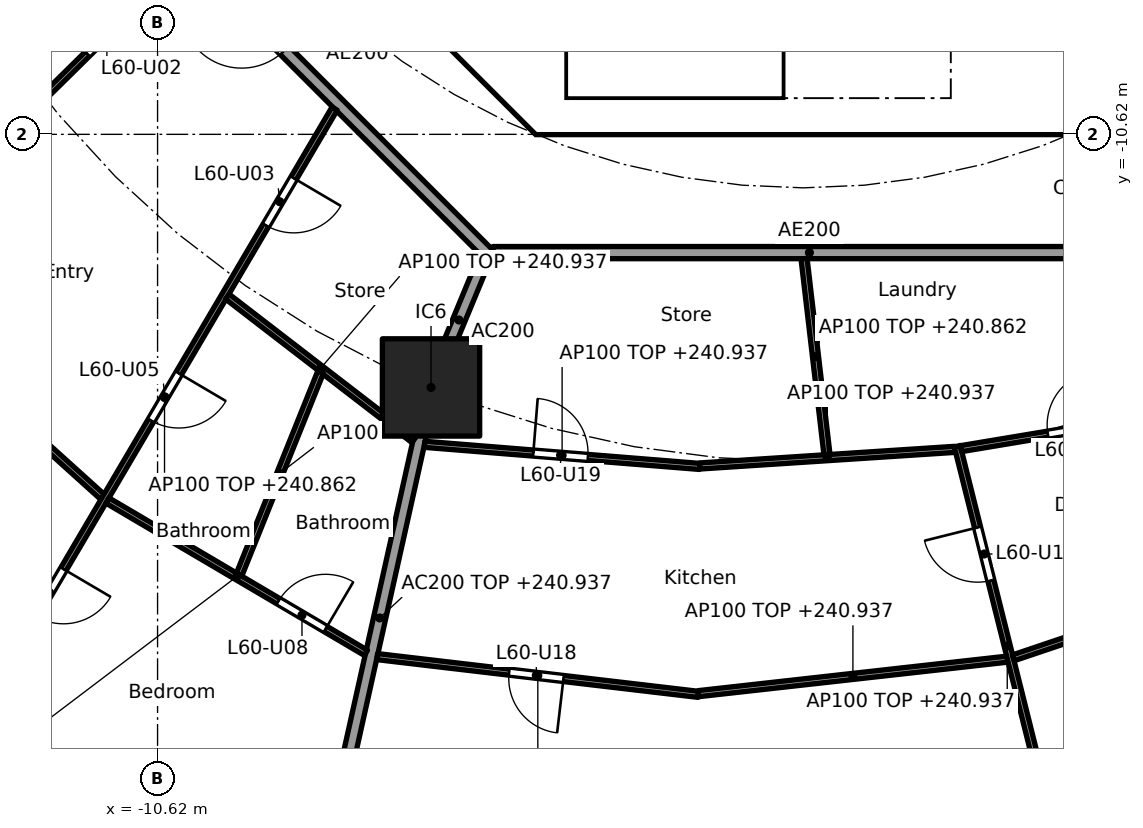
"""IFC4 building model, lengths in metres.
Left out: names, types, materials, properties, quantities, classifications, styles, units other than length and angle.
Written with IfcOpenShell. Run it as: python <this file> out.ifc"""

import sys

from ifc_helpers import new_model, si_unit, direction, frame, frame_2d, origin, origin_2d, place, context, subcontext, project, spatial, polyline, rectangle, outline, extrude, element, fill, save


model = new_model("IFC4")
c1 = context("Model", 3, precision=1e-05, world=origin(), true_north=direction((0.0, 1.0)))
c2 = subcontext(c1, "Body", "Model", "MODEL_VIEW")
j1 = project(units=[si_unit("LENGTHUNIT", "METRE"), si_unit("PLANEANGLEUNIT", "RADIAN")], contexts=[c1])
p1 = place(None, origin())
s1 = spatial("IfcSite", under=j1, at=p1, CompositionType="ELEMENT")
p2 = place(p1, origin())
s2 = spatial("IfcBuilding", under=s1, at=p2, CompositionType="ELEMENT")
p3 = place(p2, frame((0.0, 0.0, 238.1)))
s3 = spatial("IfcBuildingStorey", under=s2, at=p3, CompositionType="ELEMENT", Elevation=238.1)
p4 = place(p3, frame((-6.123, -14.782, 0.0), z_axis=(0.0, 0.0, 1.0), x_axis=(1.0, 0.0, 0.0)))
e1 = element("IfcColumn", 1, at=p4, inside=s3, PredefinedType="COLUMN", context=c2, shape_type="SweptSolid", body=[
    extrude(rectangle(XDim=1.6, YDim=1.6, at=origin_2d()), origin(), (0.0, 0.0, 1.0), 3.7),
])
p5 = place(p3, frame((-9.988, -4.613, 0.0), z_axis=(0.0, 0.0, 1.0), x_axis=(0.707106781187, -0.707106781187, 0.0)))
e2 = element("IfcWall", 2, at=p5, inside=s3, PredefinedType="SHEAR", context=c2, shape_type="SweptSolid", body=[
    extrude(rectangle(XDim=7.602, YDim=0.6, at=frame_2d((3.801, 0.0))), origin(), (0.0, 0.0, 1.0), 3.44),
])
p6 = place(p5, frame((6.151, 0.0, 0.0)))
e3 = element("IfcOpeningElement", 3, at=p6, cuts=e2, PredefinedType="OPENING", context=c2, shape_type="SweptSolid", body=[
    extrude(rectangle(XDim=1.1, YDim=2.1, at=frame_2d((0.55, 1.05))), frame((0.0, 0.31, 0.0), z_axis=(0.0, -1.0, 0.0), x_axis=(1.0, 0.0, 0.0)), (0.0, 0.0, 1.0), 0.62),
])
p7 = place(p3, frame((4.0, -10.025, 0.0), z_axis=(0.0, 0.0, 1.0), x_axis=(0.0, 1.0, 0.0)))
e4 = element("IfcWall", 4, at=p7, inside=s3, PredefinedType="SOLIDWALL", context=c2, shape_type="SweptSolid", body=[
    extrude(rectangle(XDim=3.0, YDim=0.2, at=frame_2d((1.5, 0.0))), origin(), (0.0, 0.0, 1.0), 3.44),
])
p8 = place(p7, frame((0.975, 0.0, 0.0)))
e5 = element("IfcOpeningElement", 5, at=p8, cuts=e4, PredefinedType="OPENING", context=c2, shape_type="SweptSolid", body=[
    extrude(rectangle(XDim=1.1, YDim=2.1, at=frame_2d((0.55, 1.05))), frame((0.0, 0.11, 0.0), z_axis=(0.0, -1.0, 0.0), x_axis=(1.0, 0.0, 0.0)), (0.0, 0.0, 1.0), 0.22),
])
p9 = place(p3, origin())
e6 = element("IfcWall", 6, at=p9, inside=s3, PredefinedType="SHEAR", context=c2, shape_type="SweptSolid", body=[
    extrude(outline(polyline([(-4.152, -10.025), (4.152, -10.025), (4.401, -9.776), (4.825, -10.2), (4.401, -10.625), (-4.401, -10.625), (-4.825, -10.2), (-4.401, -9.776), (-4.152, -10.025)])), origin(), (0.0, 0.0, 1.0), 3.44),
])
p10 = place(p3, origin())
e7 = element("IfcWall", 7, at=p10, inside=s3, PredefinedType="SOLIDWALL", context=c2, shape_type="SweptSolid", body=[
    extrude(outline(polyline([(-3.9, -10.025), (-4.1, -10.025), (-4.1, -7.025), (-3.9, -7.025), (-3.9, -10.025)])), origin(), (0.0, 0.0, 1.0), 3.44),
])
p11 = place(p3, frame((-5.243, -12.657, 0.0), z_axis=(0.0, 0.0, 1.0), x_axis=(-0.382691608661, -0.923876145736, 0.0)))
e8 = element("IfcWall", 8, at=p11, inside=s3, PredefinedType="PARTITIONING", context=c2, shape_type="SweptSolid", body=[
    extrude(rectangle(XDim=2.2, YDim=0.2, at=frame_2d((1.1, 0.0))), origin(), (0.0, 0.0, 1.0), 3.44),
])
p12 = place(p3, frame((-6.134, -14.831, 0.0), z_axis=(0.0, 0.0, 1.0), x_axis=(-0.217500172543, -0.976060282433, 0.0)))
e9 = element("IfcWall", 9, at=p12, inside=s3, PredefinedType="PARTITIONING", context=c2, shape_type="SweptSolid", body=[
    extrude(rectangle(XDim=7.668, YDim=0.2, at=frame_2d((3.834, 0.0))), origin(), (0.0, 0.0, 1.0), 2.837),
])
p13 = place(p3, frame((-12.635, -5.134, 0.0), z_axis=(0.0, 0.0, 1.0), x_axis=(0.707106781187, -0.707106781187, 0.0)))
e10 = element("IfcWall", 10, at=p13, inside=s3, PredefinedType="PARTITIONING", context=c2, shape_type="SweptSolid", body=[
    extrude(rectangle(XDim=10.609, YDim=0.2, at=frame_2d((5.305, 0.0))), origin(), (0.0, 0.0, 1.0), 3.44),
])
p14 = place(p13, frame((4.804, 0.0, 0.0)))
e11 = element("IfcOpeningElement", 11, at=p14, cuts=e10, PredefinedType="OPENING", context=c2, shape_type="SweptSolid", body=[
    extrude(rectangle(XDim=1.0, YDim=2.1, at=frame_2d((0.5, 1.05))), frame((0.0, 0.11, 0.0), z_axis=(0.0, -1.0, 0.0), x_axis=(1.0, 0.0, 0.0)), (0.0, 0.0, 1.0), 0.22),
])
p15 = place(p3, frame((-5.104, -12.565, 0.0), z_axis=(0.0, 0.0, 1.0), x_axis=(1.0, 0.0, 0.0)))
e12 = element("IfcWall", 12, at=p15, inside=s3, PredefinedType="PARTITIONING", context=c2, shape_type="SweptSolid", body=[
    extrude(rectangle(XDim=10.409, YDim=0.2, at=frame_2d((5.205, 0.0))), origin(), (0.0, 0.0, 1.0), 3.44),
])
p16 = place(p3, frame((-10.183, -7.728, 0.0), z_axis=(0.0, 0.0, 1.0), x_axis=(-0.711869910979, -0.702311348223, 0.0)))
e13 = element("IfcWall", 13, at=p16, inside=s3, PredefinedType="PARTITIONING", context=c2, shape_type="SweptSolid", body=[
    extrude(rectangle(XDim=7.535, YDim=0.1, at=frame_2d((3.767, 0.0))), origin(), (0.0, 0.0, 1.0), 2.762),
])
p17 = place(p16, frame((1.335, 0.0, 0.0)))
e14 = element("IfcOpeningElement", 14, at=p17, cuts=e13, PredefinedType="OPENING", context=c2, shape_type="SweptSolid", body=[
    extrude(rectangle(XDim=0.9, YDim=2.1, at=frame_2d((0.45, 1.05))), frame((0.0, 0.06, 0.0), z_axis=(0.0, -1.0, 0.0), x_axis=(1.0, 0.0, 0.0)), (0.0, 0.0, 1.0), 0.12),
])
p18 = place(p16, frame((5.077, 0.0, 0.0)))
e15 = element("IfcOpeningElement", 15, at=p18, cuts=e13, PredefinedType="OPENING", context=c2, shape_type="SweptSolid", body=[
    extrude(rectangle(XDim=0.9, YDim=2.1, at=frame_2d((0.45, 1.05))), frame((0.0, 0.06, 0.0), z_axis=(0.0, -1.0, 0.0), x_axis=(1.0, 0.0, 0.0)), (0.0, 0.0, 1.0), 0.12),
])
p19 = place(p3, frame((-15.474, -13.019, 0.0), z_axis=(0.0, 0.0, 1.0), x_axis=(0.742348572616, -0.670013878017, 0.0)))
e16 = element("IfcWall", 16, at=p19, inside=s3, PredefinedType="PARTITIONING", context=c2, shape_type="SweptSolid", body=[
    extrude(rectangle(XDim=5.319, YDim=0.1, at=frame_2d((2.66, 0.0))), origin(), (0.0, 0.0, 1.0), 2.837),
])
p20 = place(p19, frame((2.21, 0.0, 0.0)))
e17 = element("IfcOpeningElement", 17, at=p20, cuts=e16, PredefinedType="OPENING", context=c2, shape_type="SweptSolid", body=[
    extrude(rectangle(XDim=0.9, YDim=2.1, at=frame_2d((0.45, 1.05))), frame((0.0, 0.06, 0.0), z_axis=(0.0, -1.0, 0.0), x_axis=(1.0, 0.0, 0.0)), (0.0, 0.0, 1.0), 0.12),
])
p21 = place(p3, frame((-7.709, -10.198, 0.0), z_axis=(0.0, 0.0, 1.0), x_axis=(-0.507355901053, -0.8617366127, 0.0)))
e18 = element("IfcWall", 18, at=p21, inside=s3, PredefinedType="PARTITIONING", context=c2, shape_type="SweptSolid", body=[
    extrude(rectangle(XDim=11.025, YDim=0.1, at=frame_2d((5.512, 0.0))), origin(), (0.0, 0.0, 1.0), 2.762),
])
p22 = place(p21, frame((1.326, 0.0, 0.0)))
e19 = element("IfcOpeningElement", 19, at=p22, cuts=e18, PredefinedType="OPENING", context=c2, shape_type="SweptSolid", body=[
    extrude(rectangle(XDim=0.9, YDim=2.1, at=frame_2d((0.45, 1.05))), frame((0.0, 0.06, 0.0), z_axis=(0.0, -1.0, 0.0), x_axis=(1.0, 0.0, 0.0)), (0.0, 0.0, 1.0), 0.12),
])
p23 = place(p21, frame((5.05, 0.0, 0.0)))
e20 = element("IfcOpeningElement", 20, at=p23, cuts=e18, PredefinedType="OPENING", context=c2, shape_type="SweptSolid", body=[
    extrude(rectangle(XDim=0.9, YDim=2.1, at=frame_2d((0.45, 1.05))), frame((0.0, 0.06, 0.0), z_axis=(0.0, -1.0, 0.0), x_axis=(1.0, 0.0, 0.0)), (0.0, 0.0, 1.0), 0.12),
])
p24 = place(p21, frame((8.787, 0.0, 0.0)))
e21 = element("IfcOpeningElement", 21, at=p24, cuts=e18, PredefinedType="OPENING", context=c2, shape_type="SweptSolid", body=[
    extrude(rectangle(XDim=0.9, YDim=2.1, at=frame_2d((0.45, 1.05))), frame((0.0, 0.06, 0.0), z_axis=(0.0, -1.0, 0.0), x_axis=(1.0, 0.0, 0.0)), (0.0, 0.0, 1.0), 0.12),
])
p25 = place(p3, frame((-9.471, -13.289, 0.0), z_axis=(0.0, 0.0, 1.0), x_axis=(0.792227074489, -0.610226402614, 0.0)))
e22 = element("IfcWall", 22, at=p25, inside=s3, PredefinedType="PARTITIONING", context=c2, shape_type="SweptSolid", body=[
    extrude(rectangle(XDim=3.866, YDim=0.1, at=frame_2d((1.933, 0.0))), origin(), (0.0, 0.0, 1.0), 2.837),
])
p26 = place(p3, frame((-11.445, -16.641, 0.0), z_axis=(0.0, 0.0, 1.0), x_axis=(0.861568986754, -0.507640503766, 0.0)))
e23 = element("IfcWall", 23, at=p26, inside=s3, PredefinedType="PARTITIONING", context=c2, shape_type="SweptSolid", body=[
    extrude(rectangle(XDim=4.935, YDim=0.1, at=frame_2d((2.467, 0.0))), origin(), (0.0, 0.0, 1.0), 2.837),
])
p27 = place(p26, frame((3.264, 0.0, 0.0)))
e24 = element("IfcOpeningElement", 24, at=p27, cuts=e23, PredefinedType="OPENING", context=c2, shape_type="SweptSolid", body=[
    extrude(rectangle(XDim=0.9, YDim=2.1, at=frame_2d((0.45, 1.05))), frame((0.0, 0.06, 0.0), z_axis=(0.0, -1.0, 0.0), x_axis=(1.0, 0.0, 0.0)), (0.0, 0.0, 1.0), 0.12),
])
p28 = place(p3, frame((-7.939, -14.531, 0.0), z_axis=(0.0, 0.0, 1.0), x_axis=(-0.373254758443, -0.927728885666, 0.0)))
e25 = element("IfcWall", 25, at=p28, inside=s3, PredefinedType="PARTITIONING", context=c2, shape_type="SweptSolid", body=[
    extrude(rectangle(XDim=3.589, YDim=0.1, at=frame_2d((1.794, 0.0))), origin(), (0.0, 0.0, 1.0), 3.44),
])
p29 = place(p3, frame((-6.23, -15.717, 0.0), z_axis=(0.0, 0.0, 1.0), x_axis=(0.996784770134, -0.080125663978, 0.0)))
e26 = element("IfcWall", 26, at=p29, inside=s3, PredefinedType="PARTITIONING", context=c2, shape_type="SweptSolid", body=[
    extrude(rectangle(XDim=4.54, YDim=0.1, at=frame_2d((2.27, 0.0))), origin(), (0.0, 0.0, 1.0), 2.837),
])
p30 = place(p29, frame((1.795, 0.0, 0.0)))
e27 = element("IfcOpeningElement", 27, at=p30, cuts=e26, PredefinedType="OPENING", context=c2, shape_type="SweptSolid", body=[
    extrude(rectangle(XDim=0.9, YDim=2.1, at=frame_2d((0.45, 1.05))), frame((0.0, 0.06, 0.0), z_axis=(0.0, -1.0, 0.0), x_axis=(1.0, 0.0, 0.0)), (0.0, 0.0, 1.0), 0.12),
])
p31 = place(p3, frame((-7.008, -19.209, 0.0), z_axis=(0.0, 0.0, 1.0), x_axis=(0.993173459887, -0.116646811258, 0.0)))
e28 = element("IfcWall", 28, at=p31, inside=s3, PredefinedType="PARTITIONING", context=c2, shape_type="SweptSolid", body=[
    extrude(rectangle(XDim=5.318, YDim=0.1, at=frame_2d((2.659, 0.0))), origin(), (0.0, 0.0, 1.0), 2.837),
])
p32 = place(p31, frame((2.184, 0.0, 0.0)))
e29 = element("IfcOpeningElement", 29, at=p32, cuts=e28, PredefinedType="OPENING", context=c2, shape_type="SweptSolid", body=[
    extrude(rectangle(XDim=0.9, YDim=2.1, at=frame_2d((0.45, 1.05))), frame((0.0, 0.06, 0.0), z_axis=(0.0, -1.0, 0.0), x_axis=(1.0, 0.0, 0.0)), (0.0, 0.0, 1.0), 0.12),
])
p33 = place(p3, frame((-1.705, -16.074, 0.0), z_axis=(0.0, 0.0, 1.0), x_axis=(0.997885428049, 0.064997480629, 0.0)))
e30 = element("IfcWall", 30, at=p33, inside=s3, PredefinedType="PARTITIONING", context=c2, shape_type="SweptSolid", body=[
    extrude(rectangle(XDim=4.207, YDim=0.1, at=frame_2d((2.104, 0.0))), origin(), (0.0, 0.0, 1.0), 2.837),
])
p34 = place(p3, frame((-1.726, -19.818, 0.0), z_axis=(0.0, 0.0, 1.0), x_axis=(0.99381893047, 0.111013212902, 0.0)))
e31 = element("IfcWall", 31, at=p34, inside=s3, PredefinedType="PARTITIONING", context=c2, shape_type="SweptSolid", body=[
    extrude(rectangle(XDim=5.113, YDim=0.1, at=frame_2d((2.557, 0.0))), origin(), (0.0, 0.0, 1.0), 2.837),
])
p35 = place(p3, frame((0.012, -12.664, 0.0), z_axis=(0.0, 0.0, 1.0), x_axis=(0.116151589236, -0.993231497848, 0.0)))
e32 = element("IfcWall", 32, at=p35, inside=s3, PredefinedType="PARTITIONING", context=c2, shape_type="SweptSolid", body=[
    extrude(rectangle(XDim=3.245, YDim=0.1, at=frame_2d((1.623, 0.0))), origin(), (0.0, 0.0, 1.0), 2.762),
])
p36 = place(p3, frame((2.531, -15.749, 0.0), z_axis=(0.0, 0.0, 1.0), x_axis=(0.242645858264, -0.970114935184, 0.0)))
e33 = element("IfcWall", 33, at=p36, inside=s3, PredefinedType="PARTITIONING", context=c2, shape_type="SweptSolid", body=[
    extrude(rectangle(XDim=6.774, YDim=0.1, at=frame_2d((3.387, 0.0))), origin(), (0.0, 0.0, 1.0), 2.837),
])
p37 = place(p36, frame((1.377, 0.0, 0.0)))
e34 = element("IfcOpeningElement", 34, at=p37, cuts=e33, PredefinedType="OPENING", context=c2, shape_type="SweptSolid", body=[
    extrude(rectangle(XDim=0.9, YDim=2.1, at=frame_2d((0.45, 1.05))), frame((0.0, 0.06, 0.0), z_axis=(0.0, -1.0, 0.0), x_axis=(1.0, 0.0, 0.0)), (0.0, 0.0, 1.0), 0.12),
])
p38 = place(p3, frame((2.593, -15.789, 0.0), z_axis=(0.0, 0.0, 1.0), x_axis=(0.986381756816, 0.164471972749, 0.0)))
e35 = element("IfcWall", 35, at=p38, inside=s3, PredefinedType="PARTITIONING", context=c2, shape_type="SweptSolid", body=[
    extrude(rectangle(XDim=3.797, YDim=0.1, at=frame_2d((1.898, 0.0))), origin(), (0.0, 0.0, 1.0), 2.837),
])
p39 = place(p38, frame((1.448, 0.0, 0.0)))
e36 = element("IfcOpeningElement", 36, at=p39, cuts=e35, PredefinedType="OPENING", context=c2, shape_type="SweptSolid", body=[
    extrude(rectangle(XDim=0.9, YDim=2.1, at=frame_2d((0.45, 1.05))), frame((0.0, 0.06, 0.0), z_axis=(0.0, -1.0, 0.0), x_axis=(1.0, 0.0, 0.0)), (0.0, 0.0, 1.0), 0.12),
])
p40 = place(p3, frame((3.453, -19.229, 0.0), z_axis=(0.0, 0.0, 1.0), x_axis=(0.947572025416, 0.319542261133, 0.0)))
e37 = element("IfcWall", 37, at=p40, inside=s3, PredefinedType="PARTITIONING", context=c2, shape_type="SweptSolid", body=[
    extrude(rectangle(XDim=4.903, YDim=0.1, at=frame_2d((2.451, 0.0))), origin(), (0.0, 0.0, 1.0), 2.837),
])
p41 = place(p40, frame((2.001, 0.0, 0.0)))
e38 = element("IfcOpeningElement", 38, at=p41, cuts=e37, PredefinedType="OPENING", context=c2, shape_type="SweptSolid", body=[
    extrude(rectangle(XDim=0.9, YDim=2.1, at=frame_2d((0.45, 1.05))), frame((0.0, 0.06, 0.0), z_axis=(0.0, -1.0, 0.0), x_axis=(1.0, 0.0, 0.0)), (0.0, 0.0, 1.0), 0.12),
])
p42 = place(p6, origin())
e39 = element("IfcDoor", 39, at=p42, inside=s3, OperationType="SINGLE_SWING_LEFT", PredefinedType="DOOR", context=c2, shape_type="SweptSolid", body=[
    extrude(rectangle(XDim=1.1, YDim=2.1, at=frame_2d((0.55, 1.05))), frame((0.0, 0.025, 0.0), z_axis=(0.0, -1.0, 0.0), x_axis=(1.0, 0.0, 0.0)), (0.0, 0.0, 1.0), 0.05),
])
fill(e3, e39)
p43 = place(p17, frame((0.9, 0.0, 0.0), x_axis=(-1.0, 0.0, 0.0)))
e40 = element("IfcDoor", 40, at=p43, inside=s3, OperationType="SINGLE_SWING_LEFT", PredefinedType="DOOR", context=c2, shape_type="SweptSolid", body=[
    extrude(rectangle(XDim=0.9, YDim=2.1, at=frame_2d((0.45, 1.05))), frame((0.0, 0.025, 0.0), z_axis=(0.0, -1.0, 0.0), x_axis=(1.0, 0.0, 0.0)), (0.0, 0.0, 1.0), 0.05),
])
fill(e14, e40)
p44 = place(p22, origin())
e41 = element("IfcDoor", 41, at=p44, inside=s3, OperationType="SINGLE_SWING_LEFT", PredefinedType="DOOR", context=c2, shape_type="SweptSolid", body=[
    extrude(rectangle(XDim=0.9, YDim=2.1, at=frame_2d((0.45, 1.05))), frame((0.0, 0.025, 0.0), z_axis=(0.0, -1.0, 0.0), x_axis=(1.0, 0.0, 0.0)), (0.0, 0.0, 1.0), 0.05),
])
fill(e19, e41)
p45 = place(p23, origin())
e42 = element("IfcDoor", 42, at=p45, inside=s3, OperationType="SINGLE_SWING_LEFT", PredefinedType="DOOR", context=c2, shape_type="SweptSolid", body=[
    extrude(rectangle(XDim=0.9, YDim=2.1, at=frame_2d((0.45, 1.05))), frame((0.0, 0.025, 0.0), z_axis=(0.0, -1.0, 0.0), x_axis=(1.0, 0.0, 0.0)), (0.0, 0.0, 1.0), 0.05),
])
fill(e20, e42)
p46 = place(p24, origin())
e43 = element("IfcDoor", 43, at=p46, inside=s3, OperationType="SINGLE_SWING_LEFT", PredefinedType="DOOR", context=c2, shape_type="SweptSolid", body=[
    extrude(rectangle(XDim=0.9, YDim=2.1, at=frame_2d((0.45, 1.05))), frame((0.0, 0.025, 0.0), z_axis=(0.0, -1.0, 0.0), x_axis=(1.0, 0.0, 0.0)), (0.0, 0.0, 1.0), 0.05),
])
fill(e21, e43)
p47 = place(p27, origin())
e44 = element("IfcDoor", 44, at=p47, inside=s3, OperationType="SINGLE_SWING_RIGHT", PredefinedType="DOOR", context=c2, shape_type="SweptSolid", body=[
    extrude(rectangle(XDim=0.9, YDim=2.1, at=frame_2d((0.45, 1.05))), frame((0.0, 0.025, 0.0), z_axis=(0.0, -1.0, 0.0), x_axis=(1.0, 0.0, 0.0)), (0.0, 0.0, 1.0), 0.05),
])
fill(e24, e44)
p48 = place(p39, origin())
e45 = element("IfcDoor", 45, at=p48, inside=s3, OperationType="SINGLE_SWING_RIGHT", PredefinedType="DOOR", context=c2, shape_type="SweptSolid", body=[
    extrude(rectangle(XDim=0.9, YDim=2.1, at=frame_2d((0.45, 1.05))), frame((0.0, 0.025, 0.0), z_axis=(0.0, -1.0, 0.0), x_axis=(1.0, 0.0, 0.0)), (0.0, 0.0, 1.0), 0.05),
])
fill(e36, e45)
p49 = place(p37, frame((0.9, 0.0, 0.0), x_axis=(-1.0, 0.0, 0.0)))
e46 = element("IfcDoor", 46, at=p49, inside=s3, OperationType="SINGLE_SWING_RIGHT", PredefinedType="DOOR", context=c2, shape_type="SweptSolid", body=[
    extrude(rectangle(XDim=0.9, YDim=2.1, at=frame_2d((0.45, 1.05))), frame((0.0, 0.025, 0.0), z_axis=(0.0, -1.0, 0.0), x_axis=(1.0, 0.0, 0.0)), (0.0, 0.0, 1.0), 0.05),
])
fill(e34, e46)
p50 = place(p32, frame((0.9, 0.0, 0.0), x_axis=(-1.0, 0.0, 0.0)))
e47 = element("IfcDoor", 47, at=p50, inside=s3, OperationType="SINGLE_SWING_LEFT", PredefinedType="DOOR", context=c2, shape_type="SweptSolid", body=[
    extrude(rectangle(XDim=0.9, YDim=2.1, at=frame_2d((0.45, 1.05))), frame((0.0, 0.025, 0.0), z_axis=(0.0, -1.0, 0.0), x_axis=(1.0, 0.0, 0.0)), (0.0, 0.0, 1.0), 0.05),
])
fill(e29, e47)
p51 = place(p30, origin())
e48 = element("IfcDoor", 48, at=p51, inside=s3, OperationType="SINGLE_SWING_LEFT", PredefinedType="DOOR", context=c2, shape_type="SweptSolid", body=[
    extrude(rectangle(XDim=0.9, YDim=2.1, at=frame_2d((0.45, 1.05))), frame((0.0, 0.025, 0.0), z_axis=(0.0, -1.0, 0.0), x_axis=(1.0, 0.0, 0.0)), (0.0, 0.0, 1.0), 0.05),
])
fill(e27, e48)
save(model, sys.argv[1])
